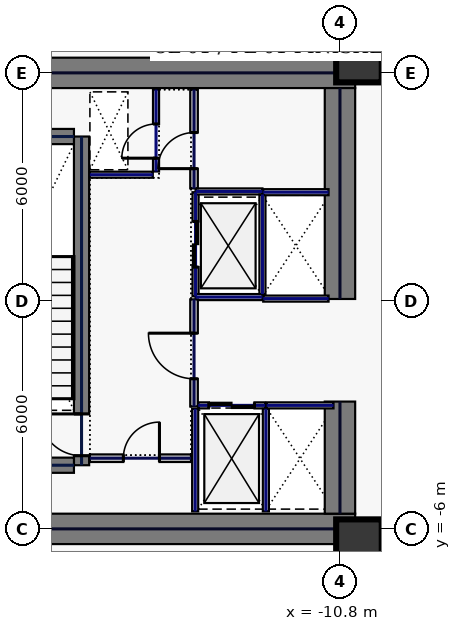
"""IFC4 building model, lengths in metres.
Left out: names, types, materials, properties, quantities, classifications, styles, units other than length and angle.
Written with IfcOpenShell. Run it as: python <this file> out.ifc"""

import sys

from ifc_helpers import new_model, si_unit, direction, frame, frame_2d, origin, origin_2d, place, context, subcontext, project, spatial, rectangle, hollow_rectangle, extrude, element, fill, save


model = new_model("IFC4")
c1 = context("Model", 3, precision=1e-05, world=origin(), true_north=direction((0.0, 1.0)))
c2 = subcontext(c1, "Body", "Model", "MODEL_VIEW")
j1 = project(units=[si_unit("LENGTHUNIT", "METRE"), si_unit("PLANEANGLEUNIT", "RADIAN")], contexts=[c1])
p1 = place(None, origin())
s1 = spatial("IfcSite", under=j1, at=p1, CompositionType="ELEMENT")
p2 = place(p1, origin())
s2 = spatial("IfcBuilding", under=s1, at=p2, CompositionType="ELEMENT")
p3 = place(p2, frame((0.0, 0.0, 79.4)))
s3 = spatial("IfcBuildingStorey", under=s2, at=p3, CompositionType="ELEMENT", Elevation=79.4)
for number, where, z_axis, x_axis in (
    (1, (-22.0, 6.0, 0.0), (0.0, 0.0, 1.0), (1.0, 0.0, 0.0)),
    (2, (-22.0, -6.0, 0.0), (0.0, 0.0, 1.0), (1.0, 0.0, 0.0)),
):
    element("IfcWall", number, at=place(p3, frame(where, z_axis=z_axis, x_axis=x_axis)), inside=s3, PredefinedType="SHEAR", context=c2, shape_type="SweptSolid", body=[
        extrude(rectangle(XDim=11.6, YDim=0.8, at=frame_2d((5.8, 0.0))), origin(), (0.0, 0.0, 1.0), 3.68),
    ])
p4 = place(p3, frame((-10.8, -5.6, 0.0), z_axis=(0.0, 0.0, 1.0), x_axis=(0.0, 1.0, 0.0)))
e3 = element("IfcWall", 3, at=p4, inside=s3, PredefinedType="SHEAR", context=c2, shape_type="SweptSolid", body=[
    extrude(rectangle(XDim=2.95, YDim=0.8, at=frame_2d((1.475, 0.0))), origin(), (0.0, 0.0, 1.0), 3.68),
])
p5 = place(p3, frame((-10.8, 0.05, 0.0), z_axis=(0.0, 0.0, 1.0), x_axis=(0.0, 1.0, 0.0)))
e4 = element("IfcWall", 4, at=p5, inside=s3, PredefinedType="SHEAR", context=c2, shape_type="SweptSolid", body=[
    extrude(rectangle(XDim=5.55, YDim=0.8, at=frame_2d((2.775, 0.0))), origin(), (0.0, 0.0, 1.0), 3.68),
])
p6 = place(p3, frame((-17.6, -4.325, 0.0), z_axis=(0.0, 0.0, 1.0), x_axis=(0.0, 1.0, 0.0)))
e5 = element("IfcWall", 5, at=p6, inside=s3, PredefinedType="SHEAR", context=c2, shape_type="SweptSolid", body=[
    extrude(rectangle(XDim=8.65, YDim=0.4, at=frame_2d((4.325, 0.0))), origin(), (0.0, 0.0, 1.0), 3.68),
])
p7 = place(p6, frame((0.25, 0.0, 0.0)))
e6 = element("IfcOpeningElement", 6, at=p7, cuts=e5, PredefinedType="OPENING", context=c2, shape_type="SweptSolid", body=[
    extrude(rectangle(XDim=1.1, YDim=2.2, at=frame_2d((0.55, 1.1))), frame((0.0, 0.21, 0.0), z_axis=(0.0, -1.0, 0.0), x_axis=(1.0, 0.0, 0.0)), (0.0, 0.0, 1.0), 0.42),
])
for number, where, z_axis, x_axis in (
    (7, (-21.2, -4.325, 0.0), (0.0, 0.0, 1.0), (1.0, 0.0, 0.0)),
    (8, (-21.2, 4.325, 0.0), (0.0, 0.0, 1.0), (1.0, 0.0, 0.0)),
):
    element("IfcWall", number, at=place(p3, frame(where, z_axis=z_axis, x_axis=x_axis)), inside=s3, PredefinedType="SHEAR", context=c2, shape_type="SweptSolid", body=[
        extrude(rectangle(XDim=3.4, YDim=0.4, at=frame_2d((1.7, 0.0))), origin(), (0.0, 0.0, 1.0), 3.68),
    ])
for number, where, z_axis, x_axis in (
    (9, (-10.3, -6.35, 0.0), (0.0, 0.0, 1.0), (1.0, 0.0, 0.0)),
    (10, (-10.3, 6.35, 0.0), (0.0, 0.0, 1.0), (1.0, 0.0, 0.0)),
):
    element("IfcColumn", number, at=place(p3, frame(where, z_axis=z_axis, x_axis=x_axis)), inside=s3, PredefinedType="COLUMN", context=c2, shape_type="SweptSolid", body=[
        extrude(hollow_rectangle(XDim=1.2, YDim=1.2, WallThickness=0.05, at=origin_2d()), origin(), (0.0, 0.0, 1.0), 3.68),
    ])
p8 = place(p3, frame((-14.6, 0.12, 0.0), z_axis=(0.0, 0.0, 1.0), x_axis=(0.0, 1.0, 0.0)))
e11 = element("IfcWall", 11, at=p8, inside=s3, PredefinedType="PARTITIONING", context=c2, shape_type="SweptSolid", body=[
    extrude(rectangle(XDim=2.74, YDim=0.16, at=frame_2d((1.37, 0.0))), origin(), (0.0, 0.0, 1.0), 3.68),
])
p9 = place(p8, frame((0.77, 0.0, 0.0)))
e12 = element("IfcOpeningElement", 12, at=p9, cuts=e11, PredefinedType="OPENING", context=c2, shape_type="SweptSolid", body=[
    extrude(rectangle(XDim=1.2, YDim=2.2, at=frame_2d((0.6, 1.1))), frame((0.0, 0.09, 0.0), z_axis=(0.0, -1.0, 0.0), x_axis=(1.0, 0.0, 0.0)), (0.0, 0.0, 1.0), 0.18),
])
for number, where, z_axis, x_axis in (
    (13, (-14.6, 0.1, 0.0), (0.0, 0.0, 1.0), (1.0, 0.0, 0.0)),
    (14, (-14.6, 2.88, 0.0), (0.0, 0.0, 1.0), (1.0, 0.0, 0.0)),
):
    element("IfcWall", number, at=place(p3, frame(where, z_axis=z_axis, x_axis=x_axis)), inside=s3, PredefinedType="PARTITIONING", context=c2, shape_type="SweptSolid", body=[
        extrude(rectangle(XDim=1.76, YDim=0.16, at=frame_2d((0.88, 0.0))), origin(), (0.0, 0.0, 1.0), 3.68),
    ])
p10 = place(p3, frame((-12.84, 0.18, 0.0), z_axis=(0.0, 0.0, 1.0), x_axis=(0.0, 1.0, 0.0)))
e15 = element("IfcWall", 15, at=p10, inside=s3, PredefinedType="PARTITIONING", context=c2, shape_type="SweptSolid", body=[
    extrude(rectangle(XDim=2.62, YDim=0.16, at=frame_2d((1.31, 0.0))), origin(), (0.0, 0.0, 1.0), 3.68),
])
p11 = place(p3, frame((-14.53, -2.75, 0.0), z_axis=(0.0, 0.0, 1.0), x_axis=(1.0, 0.0, 0.0)))
e16 = element("IfcWall", 16, at=p11, inside=s3, PredefinedType="PARTITIONING", context=c2, shape_type="SweptSolid", body=[
    extrude(rectangle(XDim=1.76, YDim=0.16, at=frame_2d((0.88, 0.0))), origin(), (0.0, 0.0, 1.0), 3.68),
])
p12 = place(p11, frame((0.28, 0.0, 0.0)))
e17 = element("IfcOpeningElement", 17, at=p12, cuts=e16, PredefinedType="OPENING", context=c2, shape_type="SweptSolid", body=[
    extrude(rectangle(XDim=1.2, YDim=2.2, at=frame_2d((0.6, 1.1))), frame((0.0, 0.09, 0.0), z_axis=(0.0, -1.0, 0.0), x_axis=(1.0, 0.0, 0.0)), (0.0, 0.0, 1.0), 0.18),
])
for number, where, z_axis, x_axis in (
    (18, (-12.75, -5.54, 0.0), (0.0, 0.0, 1.0), (0.0, 1.0, 0.0)),
    (19, (-14.61, -5.54, 0.0), (0.0, 0.0, 1.0), (0.0, 1.0, 0.0)),
):
    element("IfcWall", number, at=place(p3, frame(where, z_axis=z_axis, x_axis=x_axis)), inside=s3, PredefinedType="PARTITIONING", context=c2, shape_type="SweptSolid", body=[
        extrude(rectangle(XDim=2.7, YDim=0.16, at=frame_2d((1.35, 0.0))), origin(), (0.0, 0.0, 1.0), 3.68),
    ])
p13 = place(p3, frame((-12.73, -2.75, 0.0), z_axis=(0.0, 0.0, 1.0), x_axis=(1.0, 0.0, 0.0)))
e20 = element("IfcWall", 20, at=p13, inside=s3, PredefinedType="PARTITIONING", context=c2, shape_type="SweptSolid", body=[
    extrude(rectangle(XDim=1.76, YDim=0.16, at=frame_2d((0.88, 0.0))), origin(), (0.0, 0.0, 1.0), 3.68),
])
for number, where, z_axis, x_axis in (
    (21, (-12.82, 0.06, 0.0), (0.0, 0.0, 1.0), (1.0, 0.0, 0.0)),
    (22, (-12.82, 2.86, 0.0), (0.0, 0.0, 1.0), (1.0, 0.0, 0.0)),
):
    element("IfcWall", number, at=place(p3, frame(where, z_axis=z_axis, x_axis=x_axis)), inside=s3, PredefinedType="PARTITIONING", context=c2, shape_type="SweptSolid", body=[
        extrude(rectangle(XDim=1.72, YDim=0.16, at=frame_2d((0.86, 0.0))), origin(), (0.0, 0.0, 1.0), 3.68),
    ])
p14 = place(p3, frame((-15.64, 3.405, 0.0), z_axis=(0.0, 0.0, 1.0), x_axis=(0.0, 1.0, 0.0)))
e23 = element("IfcWall", 23, at=p14, inside=s3, PredefinedType="PARTITIONING", context=c2, shape_type="SweptSolid", body=[
    extrude(rectangle(XDim=2.155, YDim=0.16, at=frame_2d((1.078, 0.0))), origin(), (0.0, 0.0, 1.0), 3.68),
])
p15 = place(p14, frame((0.35, 0.0, 0.0)))
e24 = element("IfcOpeningElement", 24, at=p15, cuts=e23, PredefinedType="OPENING", context=c2, shape_type="SweptSolid", body=[
    extrude(rectangle(XDim=0.9, YDim=2.2, at=frame_2d((0.45, 1.1))), frame((0.0, 0.09, 0.0), z_axis=(0.0, -1.0, 0.0), x_axis=(1.0, 0.0, 0.0)), (0.0, 0.0, 1.0), 0.18),
])
p16 = place(p3, frame((-17.38, 3.32, 0.0), z_axis=(0.0, 0.0, 1.0), x_axis=(1.0, 0.0, 0.0)))
e25 = element("IfcWall", 25, at=p16, inside=s3, PredefinedType="PARTITIONING", context=c2, shape_type="SweptSolid", body=[
    extrude(rectangle(XDim=1.655, YDim=0.16, at=frame_2d((0.827, 0.0))), origin(), (0.0, 0.0, 1.0), 3.68),
])
p17 = place(p3, frame((-17.38, -4.14, 0.0), z_axis=(0.0, 0.0, 1.0), x_axis=(1.0, 0.0, 0.0)))
e26 = element("IfcWall", 26, at=p17, inside=s3, PredefinedType="SOLIDWALL", context=c2, shape_type="SweptSolid", body=[
    extrude(rectangle(XDim=2.66, YDim=0.2, at=frame_2d((1.33, 0.0))), origin(), (0.0, 0.0, 1.0), 3.68),
])
p18 = place(p17, frame((0.88, 0.0, 0.0)))
e27 = element("IfcOpeningElement", 27, at=p18, cuts=e26, PredefinedType="OPENING", context=c2, shape_type="SweptSolid", body=[
    extrude(rectangle(XDim=0.95, YDim=2.2, at=frame_2d((0.475, 1.1))), frame((0.0, 0.11, 0.0), z_axis=(0.0, -1.0, 0.0), x_axis=(1.0, 0.0, 0.0)), (0.0, 0.0, 1.0), 0.22),
])
p19 = place(p3, frame((-14.64, 2.96, 0.0), z_axis=(0.0, 0.0, 1.0), x_axis=(0.0, 1.0, 0.0)))
e28 = element("IfcWall", 28, at=p19, inside=s3, PredefinedType="SOLIDWALL", context=c2, shape_type="SweptSolid", body=[
    extrude(rectangle(XDim=2.6, YDim=0.2, at=frame_2d((1.3, 0.0))), origin(), (0.0, 0.0, 1.0), 3.68),
])
p20 = place(p19, frame((0.52, 0.0, 0.0)))
e29 = element("IfcOpeningElement", 29, at=p20, cuts=e28, PredefinedType="OPENING", context=c2, shape_type="SweptSolid", body=[
    extrude(rectangle(XDim=0.95, YDim=2.2, at=frame_2d((0.475, 1.1))), frame((0.0, 0.11, 0.0), z_axis=(0.0, -1.0, 0.0), x_axis=(1.0, 0.0, 0.0)), (0.0, 0.0, 1.0), 0.22),
])
p21 = place(p3, frame((-14.64, -2.78, 0.0), z_axis=(0.0, 0.0, 1.0), x_axis=(0.0, 1.0, 0.0)))
e30 = element("IfcWall", 30, at=p21, inside=s3, PredefinedType="SOLIDWALL", context=c2, shape_type="SweptSolid", body=[
    extrude(rectangle(XDim=2.82, YDim=0.2, at=frame_2d((1.41, 0.0))), origin(), (0.0, 0.0, 1.0), 3.68),
])
p22 = place(p21, frame((0.73, 0.0, 0.0)))
e31 = element("IfcOpeningElement", 31, at=p22, cuts=e30, PredefinedType="OPENING", context=c2, shape_type="SweptSolid", body=[
    extrude(rectangle(XDim=1.2, YDim=2.2, at=frame_2d((0.6, 1.1))), frame((0.0, 0.11, 0.0), z_axis=(0.0, -1.0, 0.0), x_axis=(1.0, 0.0, 0.0)), (0.0, 0.0, 1.0), 0.22),
])
p23 = place(p3, frame((-10.58, -6.985, 0.0), z_axis=(0.0, 0.0, 1.0), x_axis=(0.0, 1.0, 0.0)))
e32 = element("IfcWall", 32, at=p23, inside=s3, PredefinedType="PARTITIONING", context=c2, shape_type="SweptSolid", body=[
    extrude(rectangle(XDim=0.565, YDim=0.16, at=frame_2d((0.283, 0.0))), origin(), (0.0, 0.0, 1.0), 3.68),
])
p24 = place(p3, frame((-10.58, 6.42, 0.0), z_axis=(0.0, 0.0, 1.0), x_axis=(0.0, 1.0, 0.0)))
e33 = element("IfcWall", 33, at=p24, inside=s3, PredefinedType="PARTITIONING", context=c2, shape_type="SweptSolid", body=[
    extrude(rectangle(XDim=0.765, YDim=0.16, at=frame_2d((0.383, 0.0))), origin(), (0.0, 0.0, 1.0), 3.68),
])
p25 = place(p7, origin())
e34 = element("IfcDoor", 34, at=p25, inside=s3, OperationType="SINGLE_SWING_RIGHT", PredefinedType="DOOR", context=c2, shape_type="SweptSolid", body=[
    extrude(rectangle(XDim=1.1, YDim=2.2, at=frame_2d((0.55, 1.1))), frame((0.0, 0.025, 0.0), z_axis=(0.0, -1.0, 0.0), x_axis=(1.0, 0.0, 0.0)), (0.0, 0.0, 1.0), 0.05),
])
fill(e6, e34)
p26 = place(p9, origin())
e35 = element("IfcDoor", 35, at=p26, inside=s3, OperationType="SLIDING_TO_LEFT", PredefinedType="DOOR", context=c2, shape_type="SweptSolid", body=[
    extrude(rectangle(XDim=1.2, YDim=2.2, at=frame_2d((0.6, 1.1))), frame((0.0, 0.025, 0.0), z_axis=(0.0, -1.0, 0.0), x_axis=(1.0, 0.0, 0.0)), (0.0, 0.0, 1.0), 0.05),
])
fill(e12, e35)
p27 = place(p12, origin())
e36 = element("IfcDoor", 36, at=p27, inside=s3, OperationType="SLIDING_TO_LEFT", PredefinedType="DOOR", context=c2, shape_type="SweptSolid", body=[
    extrude(rectangle(XDim=1.2, YDim=2.2, at=frame_2d((0.6, 1.1))), frame((0.0, 0.025, 0.0), z_axis=(0.0, -1.0, 0.0), x_axis=(1.0, 0.0, 0.0)), (0.0, 0.0, 1.0), 0.05),
])
fill(e17, e36)
p28 = place(p15, origin())
e37 = element("IfcDoor", 37, at=p28, inside=s3, OperationType="SINGLE_SWING_LEFT", PredefinedType="DOOR", context=c2, shape_type="SweptSolid", body=[
    extrude(rectangle(XDim=0.9, YDim=2.2, at=frame_2d((0.45, 1.1))), frame((0.0, 0.025, 0.0), z_axis=(0.0, -1.0, 0.0), x_axis=(1.0, 0.0, 0.0)), (0.0, 0.0, 1.0), 0.05),
])
fill(e24, e37)
p29 = place(p18, origin())
e38 = element("IfcDoor", 38, at=p29, inside=s3, OperationType="SINGLE_SWING_RIGHT", PredefinedType="DOOR", context=c2, shape_type="SweptSolid", body=[
    extrude(rectangle(XDim=0.95, YDim=2.2, at=frame_2d((0.475, 1.1))), frame((0.0, 0.025, 0.0), z_axis=(0.0, -1.0, 0.0), x_axis=(1.0, 0.0, 0.0)), (0.0, 0.0, 1.0), 0.05),
])
fill(e27, e38)
p30 = place(p20, origin())
e39 = element("IfcDoor", 39, at=p30, inside=s3, OperationType="SINGLE_SWING_LEFT", PredefinedType="DOOR", context=c2, shape_type="SweptSolid", body=[
    extrude(rectangle(XDim=0.95, YDim=2.2, at=frame_2d((0.475, 1.1))), frame((0.0, 0.025, 0.0), z_axis=(0.0, -1.0, 0.0), x_axis=(1.0, 0.0, 0.0)), (0.0, 0.0, 1.0), 0.05),
])
fill(e29, e39)
p31 = place(p22, origin())
e40 = element("IfcDoor", 40, at=p31, inside=s3, OperationType="SINGLE_SWING_RIGHT", PredefinedType="DOOR", context=c2, shape_type="SweptSolid", body=[
    extrude(rectangle(XDim=1.2, YDim=2.2, at=frame_2d((0.6, 1.1))), frame((0.0, 0.025, 0.0), z_axis=(0.0, -1.0, 0.0), x_axis=(1.0, 0.0, 0.0)), (0.0, 0.0, 1.0), 0.05),
])
fill(e31, e40)
save(model, sys.argv[1])
